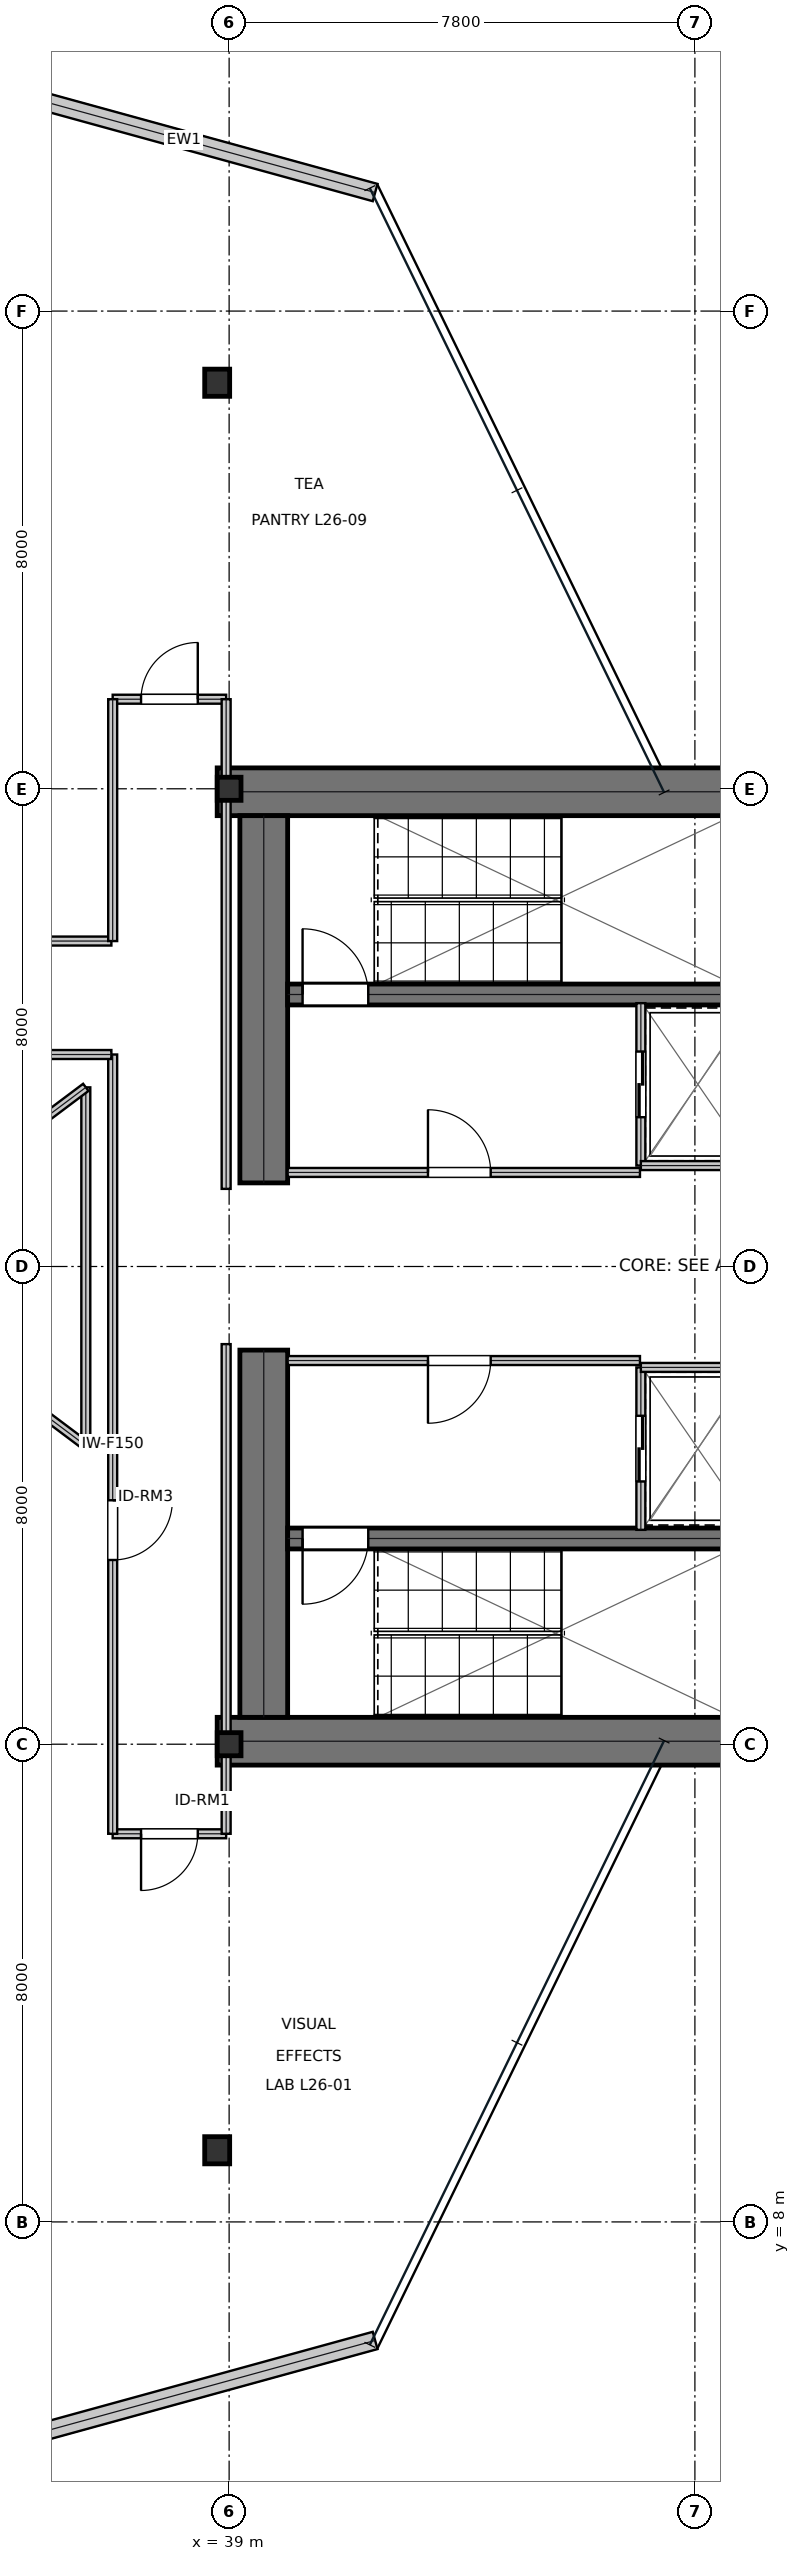
"""IFC4 building model, lengths in metres.
Left out: names, types, materials, properties, quantities, classifications, styles, units other than length and angle.
Written with IfcOpenShell. Run it as: python <this file> out.ifc"""

import sys

from ifc_helpers import new_model, si_unit, direction, frame, frame_2d, origin, origin_2d, place, context, subcontext, project, spatial, rectangle, i_section, extrude, element, fill, save


model = new_model("IFC4")
c1 = context("Model", 3, precision=1e-05, world=origin(), true_north=direction((0.0, 1.0)))
c2 = subcontext(c1, "Body", "Model", "MODEL_VIEW")
j1 = project(units=[si_unit("LENGTHUNIT", "METRE"), si_unit("PLANEANGLEUNIT", "RADIAN")], contexts=[c1])
p1 = place(None, origin())
s1 = spatial("IfcSite", under=j1, at=p1, CompositionType="ELEMENT")
p2 = place(p1, origin())
s2 = spatial("IfcBuilding", under=s1, at=p2, CompositionType="ELEMENT")
p3 = place(p2, frame((0.0, 0.0, 116.85)))
s3 = spatial("IfcBuildingStorey", under=s2, at=p3, CompositionType="ELEMENT", Elevation=116.85)
for number, where, z_axis, x_axis in (
    (1, (38.8, 31.95, 0.0), (0.0, 0.0, 1.0), (1.0, 0.0, 0.0)),
    (2, (38.8, 16.05, 0.0), (0.0, 0.0, 1.0), (1.0, 0.0, 0.0)),
):
    element("IfcWall", number, at=place(p3, frame(where, z_axis=z_axis, x_axis=x_axis)), inside=s3, PredefinedType="SHEAR", context=c2, shape_type="SweptSolid", body=[
        extrude(rectangle(XDim=16.0, YDim=0.8, at=frame_2d((8.0, 0.0))), origin(), (0.0, 0.0, 1.0), 3.81),
    ])
for number, where, z_axis, x_axis in (
    (3, (39.58, 16.45, 0.0), (0.0, 0.0, 1.0), (0.0, 1.0, 0.0)),
    (4, (39.58, 25.4, 0.0), (0.0, 0.0, 1.0), (0.0, 1.0, 0.0)),
):
    element("IfcWall", number, at=place(p3, frame(where, z_axis=z_axis, x_axis=x_axis)), inside=s3, PredefinedType="SHEAR", context=c2, shape_type="SweptSolid", body=[
        extrude(rectangle(XDim=6.15, YDim=0.8, at=frame_2d((3.075, 0.0))), origin(), (0.0, 0.0, 1.0), 3.81),
    ])
p4 = place(p3, frame((39.98, 28.555, 0.0), z_axis=(0.0, 0.0, 1.0), x_axis=(1.0, 0.0, 0.0)))
e5 = element("IfcWall", 5, at=p4, inside=s3, PredefinedType="SHEAR", context=c2, shape_type="SweptSolid", body=[
    extrude(rectangle(XDim=7.71, YDim=0.35, at=frame_2d((3.855, 0.0))), origin(), (0.0, 0.0, 1.0), 3.81),
])
p5 = place(p4, frame((0.25, 0.0, 0.0)))
e6 = element("IfcOpeningElement", 6, at=p5, cuts=e5, PredefinedType="OPENING", context=c2, shape_type="SweptSolid", body=[
    extrude(rectangle(XDim=1.1, YDim=2.15, at=frame_2d((0.55, 1.075))), frame((0.0, 0.185, 0.0), z_axis=(0.0, -1.0, 0.0), x_axis=(1.0, 0.0, 0.0)), (0.0, 0.0, 1.0), 0.37),
])
p6 = place(p3, frame((39.98, 19.445, 0.0), z_axis=(0.0, 0.0, 1.0), x_axis=(1.0, 0.0, 0.0)))
e7 = element("IfcWall", 7, at=p6, inside=s3, PredefinedType="SHEAR", context=c2, shape_type="SweptSolid", body=[
    extrude(rectangle(XDim=7.71, YDim=0.35, at=frame_2d((3.855, 0.0))), origin(), (0.0, 0.0, 1.0), 3.81),
])
p7 = place(p6, frame((0.25, 0.0, 0.0)))
e8 = element("IfcOpeningElement", 8, at=p7, cuts=e7, PredefinedType="OPENING", context=c2, shape_type="SweptSolid", body=[
    extrude(rectangle(XDim=1.1, YDim=2.15, at=frame_2d((0.55, 1.075))), frame((0.0, 0.185, 0.0), z_axis=(0.0, -1.0, 0.0), x_axis=(1.0, 0.0, 0.0)), (0.0, 0.0, 1.0), 0.37),
])
for number, where, z_axis, x_axis in (
    (9, (39.0, 16.0, 0.0), (0.0, 0.0, 1.0), (1.0, 0.0, 0.0)),
    (10, (39.0, 32.0, 0.0), (0.0, 0.0, 1.0), (1.0, 0.0, 0.0)),
):
    element("IfcColumn", number, at=place(p3, frame(where, z_axis=z_axis, x_axis=x_axis)), inside=s3, PredefinedType="COLUMN", context=c2, shape_type="SweptSolid", body=[
        extrude(i_section(OverallWidth=0.398, OverallDepth=0.387, WebThickness=0.021, FlangeThickness=0.033, at=origin_2d()), origin(), (0.0, 0.0, 1.0), 4.044),
    ])
for number, where, z_axis, x_axis in (
    (11, (38.8, 38.8, 0.016), (0.0, 0.0, 1.0), (1.0, 0.0, 0.0)),
    (12, (38.8, 9.2, 0.016), (0.0, 0.0, 1.0), (1.0, 0.0, 0.0)),
):
    element("IfcColumn", number, at=place(p3, frame(where, z_axis=z_axis, x_axis=x_axis)), inside=s3, PredefinedType="COLUMN", context=c2, shape_type="SweptSolid", body=[
        extrude(i_section(OverallWidth=0.418, OverallDepth=0.455, WebThickness=0.042, FlangeThickness=0.068, at=origin_2d()), origin(), (0.0, 0.0, 1.0), 4.018),
    ])
for number, where, z_axis, x_axis in (
    (13, (41.445, 41.985, 0.0), (0.0, 0.0, 1.0), (-0.964, 0.265, 0.0)),
    (14, (35.043, 4.255, 0.0), (0.0, 0.0, 1.0), (0.964, 0.265, 0.0)),
):
    element("IfcWall", number, at=place(p3, frame(where, z_axis=z_axis, x_axis=x_axis)), inside=s3, PredefinedType="STANDARD", context=c2, shape_type="SweptSolid", body=[
        extrude(rectangle(XDim=6.64, YDim=0.3, at=frame_2d((3.32, 0.0))), origin(), (0.0, 0.0, 1.0), 3.81),
    ])
p8 = place(p3, frame((39.98, 25.575, 0.0), z_axis=(0.0, 0.0, 1.0), x_axis=(1.0, 0.0, 0.0)))
e15 = element("IfcWall", 15, at=p8, inside=s3, PredefinedType="PARTITIONING", context=c2, shape_type="SweptSolid", body=[
    extrude(rectangle(XDim=5.9, YDim=0.15, at=frame_2d((2.95, 0.0))), origin(), (0.0, 0.0, 1.0), 3.81),
])
p9 = place(p8, frame((2.35, 0.0, 0.0)))
e16 = element("IfcOpeningElement", 16, at=p9, cuts=e15, PredefinedType="OPENING", context=c2, shape_type="SweptSolid", body=[
    extrude(rectangle(XDim=1.05, YDim=2.15, at=frame_2d((0.525, 1.075))), frame((0.0, 0.085, 0.0), z_axis=(0.0, -1.0, 0.0), x_axis=(1.0, 0.0, 0.0)), (0.0, 0.0, 1.0), 0.17),
])
p10 = place(p3, frame((39.98, 22.425, 0.0), z_axis=(0.0, 0.0, 1.0), x_axis=(1.0, 0.0, 0.0)))
e17 = element("IfcWall", 17, at=p10, inside=s3, PredefinedType="PARTITIONING", context=c2, shape_type="SweptSolid", body=[
    extrude(rectangle(XDim=5.9, YDim=0.15, at=frame_2d((2.95, 0.0))), origin(), (0.0, 0.0, 1.0), 3.81),
])
p11 = place(p10, frame((2.35, 0.0, 0.0)))
e18 = element("IfcOpeningElement", 18, at=p11, cuts=e17, PredefinedType="OPENING", context=c2, shape_type="SweptSolid", body=[
    extrude(rectangle(XDim=1.05, YDim=2.15, at=frame_2d((0.525, 1.075))), frame((0.0, 0.085, 0.0), z_axis=(0.0, -1.0, 0.0), x_axis=(1.0, 0.0, 0.0)), (0.0, 0.0, 1.0), 0.17),
])
p12 = place(p3, frame((45.895, 25.69, 0.0), z_axis=(0.0, 0.0, 1.0), x_axis=(0.0, 1.0, 0.0)))
e19 = element("IfcWall", 19, at=p12, inside=s3, PredefinedType="PARTITIONING", context=c2, shape_type="SweptSolid", body=[
    extrude(rectangle(XDim=2.72, YDim=0.15, at=frame_2d((1.36, 0.0))), origin(), (0.0, 0.0, 1.0), 3.81),
])
p13 = place(p12, frame((0.81, 0.0, 0.0)))
e20 = element("IfcOpeningElement", 20, at=p13, cuts=e19, PredefinedType="OPENING", context=c2, shape_type="SweptSolid", body=[
    extrude(rectangle(XDim=1.1, YDim=2.15, at=frame_2d((0.55, 1.075))), frame((0.0, 0.085, 0.0), z_axis=(0.0, -1.0, 0.0), x_axis=(1.0, 0.0, 0.0)), (0.0, 0.0, 1.0), 0.17),
])
p14 = place(p3, frame((45.895, 25.69, 0.0), z_axis=(0.0, 0.0, 1.0), x_axis=(1.0, 0.0, 0.0)))
e21 = element("IfcWall", 21, at=p14, inside=s3, PredefinedType="PARTITIONING", context=c2, shape_type="SweptSolid", body=[
    extrude(rectangle(XDim=1.915, YDim=0.15, at=frame_2d((0.958, 0.0))), origin(), (0.0, 0.0, 1.0), 3.81),
])
p15 = place(p3, frame((45.895, 19.59, 0.0), z_axis=(0.0, 0.0, 1.0), x_axis=(0.0, 1.0, 0.0)))
e22 = element("IfcWall", 22, at=p15, inside=s3, PredefinedType="PARTITIONING", context=c2, shape_type="SweptSolid", body=[
    extrude(rectangle(XDim=2.72, YDim=0.15, at=frame_2d((1.36, 0.0))), origin(), (0.0, 0.0, 1.0), 3.81),
])
p16 = place(p15, frame((0.81, 0.0, 0.0)))
e23 = element("IfcOpeningElement", 23, at=p16, cuts=e22, PredefinedType="OPENING", context=c2, shape_type="SweptSolid", body=[
    extrude(rectangle(XDim=1.1, YDim=2.15, at=frame_2d((0.55, 1.075))), frame((0.0, 0.085, 0.0), z_axis=(0.0, -1.0, 0.0), x_axis=(1.0, 0.0, 0.0)), (0.0, 0.0, 1.0), 0.17),
])
p17 = place(p3, frame((45.895, 22.31, 0.0), z_axis=(0.0, 0.0, 1.0), x_axis=(1.0, 0.0, 0.0)))
e24 = element("IfcWall", 24, at=p17, inside=s3, PredefinedType="PARTITIONING", context=c2, shape_type="SweptSolid", body=[
    extrude(rectangle(XDim=1.915, YDim=0.15, at=frame_2d((0.958, 0.0))), origin(), (0.0, 0.0, 1.0), 3.81),
])
p18 = place(p3, frame((37.05, 14.5, 0.0), z_axis=(0.0, 0.0, 1.0), x_axis=(1.0, 0.0, 0.0)))
e25 = element("IfcWall", 25, at=p18, inside=s3, PredefinedType="PARTITIONING", context=c2, shape_type="SweptSolid", body=[
    extrude(rectangle(XDim=1.9, YDim=0.15, at=frame_2d((0.95, 0.0))), origin(), (0.0, 0.0, 1.0), 3.19),
])
p19 = place(p18, frame((0.475, 0.0, 0.0)))
e26 = element("IfcOpeningElement", 26, at=p19, cuts=e25, PredefinedType="OPENING", context=c2, shape_type="SweptSolid", body=[
    extrude(rectangle(XDim=0.95, YDim=2.15, at=frame_2d((0.475, 1.075))), frame((0.0, 0.085, 0.0), z_axis=(0.0, -1.0, 0.0), x_axis=(1.0, 0.0, 0.0)), (0.0, 0.0, 1.0), 0.17),
])
p20 = place(p3, frame((37.05, 14.5, 0.0), z_axis=(0.0, 0.0, 1.0), x_axis=(0.0, 1.0, 0.0)))
e27 = element("IfcWall", 27, at=p20, inside=s3, PredefinedType="PARTITIONING", context=c2, shape_type="SweptSolid", body=[
    extrude(rectangle(XDim=13.05, YDim=0.15, at=frame_2d((6.525, 0.0))), origin(), (0.0, 0.0, 1.0), 3.19),
])
p21 = place(p20, frame((4.585, 0.0, 0.0)))
e28 = element("IfcOpeningElement", 28, at=p21, cuts=e27, PredefinedType="OPENING", context=c2, shape_type="SweptSolid", body=[
    extrude(rectangle(XDim=1.0, YDim=2.15, at=frame_2d((0.5, 1.075))), frame((0.0, 0.085, 0.0), z_axis=(0.0, -1.0, 0.0), x_axis=(1.0, 0.0, 0.0)), (0.0, 0.0, 1.0), 0.17),
])
p22 = place(p3, frame((29.4, 29.45, 0.0), z_axis=(0.0, 0.0, 1.0), x_axis=(1.0, 0.0, 0.0)))
e29 = element("IfcWall", 29, at=p22, inside=s3, PredefinedType="PARTITIONING", context=c2, shape_type="SweptSolid", body=[
    extrude(rectangle(XDim=7.628, YDim=0.15, at=frame_2d((3.814, 0.0))), origin(), (0.0, 0.0, 1.0), 3.19),
])
p23 = place(p22, frame((3.314, 0.0, 0.0)))
e30 = element("IfcOpeningElement", 30, at=p23, cuts=e29, PredefinedType="OPENING", context=c2, shape_type="SweptSolid", body=[
    extrude(rectangle(XDim=1.0, YDim=2.15, at=frame_2d((0.5, 1.075))), frame((0.0, 0.085, 0.0), z_axis=(0.0, -1.0, 0.0), x_axis=(1.0, 0.0, 0.0)), (0.0, 0.0, 1.0), 0.17),
])
p24 = place(p3, frame((37.05, 33.5, 0.0), z_axis=(0.0, 0.0, 1.0), x_axis=(1.0, 0.0, 0.0)))
e31 = element("IfcWall", 31, at=p24, inside=s3, PredefinedType="PARTITIONING", context=c2, shape_type="SweptSolid", body=[
    extrude(rectangle(XDim=1.9, YDim=0.15, at=frame_2d((0.95, 0.0))), origin(), (0.0, 0.0, 1.0), 3.19),
])
p25 = place(p24, frame((0.475, 0.0, 0.0)))
e32 = element("IfcOpeningElement", 32, at=p25, cuts=e31, PredefinedType="OPENING", context=c2, shape_type="SweptSolid", body=[
    extrude(rectangle(XDim=0.95, YDim=2.15, at=frame_2d((0.475, 1.075))), frame((0.0, 0.085, 0.0), z_axis=(0.0, -1.0, 0.0), x_axis=(1.0, 0.0, 0.0)), (0.0, 0.0, 1.0), 0.17),
])
p26 = place(p3, frame((38.95, 14.5, 0.0), z_axis=(0.0, 0.0, 1.0), x_axis=(0.0, 1.0, 0.0)))
e33 = element("IfcWall", 33, at=p26, inside=s3, PredefinedType="PARTITIONING", context=c2, shape_type="SweptSolid", body=[
    extrude(rectangle(XDim=8.2, YDim=0.15, at=frame_2d((4.1, 0.0))), origin(), (0.0, 0.0, 1.0), 3.19),
])
p27 = place(p3, frame((29.4, 27.55, 0.0), z_axis=(0.0, 0.0, 1.0), x_axis=(1.0, 0.0, 0.0)))
e34 = element("IfcWall", 34, at=p27, inside=s3, PredefinedType="PARTITIONING", context=c2, shape_type="SweptSolid", body=[
    extrude(rectangle(XDim=7.628, YDim=0.15, at=frame_2d((3.814, 0.0))), origin(), (0.0, 0.0, 1.0), 3.19),
])
p28 = place(p3, frame((37.05, 29.45, 0.0), z_axis=(0.0, 0.0, 1.0), x_axis=(0.0, 1.0, 0.0)))
e35 = element("IfcWall", 35, at=p28, inside=s3, PredefinedType="PARTITIONING", context=c2, shape_type="SweptSolid", body=[
    extrude(rectangle(XDim=4.05, YDim=0.15, at=frame_2d((2.025, 0.0))), origin(), (0.0, 0.0, 1.0), 3.19),
])
p29 = place(p3, frame((38.95, 25.3, 0.0), z_axis=(0.0, 0.0, 1.0), x_axis=(0.0, 1.0, 0.0)))
e36 = element("IfcWall", 36, at=p29, inside=s3, PredefinedType="PARTITIONING", context=c2, shape_type="SweptSolid", body=[
    extrude(rectangle(XDim=8.2, YDim=0.15, at=frame_2d((4.1, 0.0))), origin(), (0.0, 0.0, 1.0), 3.19),
])
p30 = place(p3, frame((32.6, 24.0, 0.0), z_axis=(0.0, 0.0, 1.0), x_axis=(0.8, -0.6, 0.0)))
e37 = element("IfcWall", 37, at=p30, inside=s3, PredefinedType="MOVABLE", context=c2, shape_type="SweptSolid", body=[
    extrude(rectangle(XDim=5.0, YDim=0.15, at=frame_2d((2.5, 0.0))), origin(), (0.0, 0.0, 1.0), 3.81),
])
p31 = place(p3, frame((36.6, 21.0, 0.0), z_axis=(0.0, 0.0, 1.0), x_axis=(0.0, 1.0, 0.0)))
e38 = element("IfcWall", 38, at=p31, inside=s3, PredefinedType="MOVABLE", context=c2, shape_type="SweptSolid", body=[
    extrude(rectangle(XDim=6.0, YDim=0.15, at=frame_2d((3.0, 0.0))), origin(), (0.0, 0.0, 1.0), 3.81),
])
p32 = place(p3, frame((36.6, 27.0, 0.0), z_axis=(0.0, 0.0, 1.0), x_axis=(-0.8, -0.6, 0.0)))
e39 = element("IfcWall", 39, at=p32, inside=s3, PredefinedType="MOVABLE", context=c2, shape_type="SweptSolid", body=[
    extrude(rectangle(XDim=5.0, YDim=0.15, at=frame_2d((2.5, 0.0))), origin(), (0.0, 0.0, 1.0), 3.81),
])
p33 = place(p9, origin())
e40 = element("IfcDoor", 40, at=p33, inside=s3, OperationType="SINGLE_SWING_LEFT", PredefinedType="DOOR", context=c2, shape_type="SweptSolid", body=[
    extrude(rectangle(XDim=1.05, YDim=2.15, at=frame_2d((0.525, 1.075))), frame((0.0, 0.025, 0.0), z_axis=(0.0, -1.0, 0.0), x_axis=(1.0, 0.0, 0.0)), (0.0, 0.0, 1.0), 0.05),
])
fill(e16, e40)
p34 = place(p11, frame((1.05, 0.0, 0.0), z_axis=(0.0, 0.0, 1.0), x_axis=(-1.0, 0.0, 0.0)))
e41 = element("IfcDoor", 41, at=p34, inside=s3, OperationType="SINGLE_SWING_RIGHT", PredefinedType="DOOR", context=c2, shape_type="SweptSolid", body=[
    extrude(rectangle(XDim=1.05, YDim=2.15, at=frame_2d((0.525, 1.075))), frame((0.0, 0.025, 0.0), z_axis=(0.0, -1.0, 0.0), x_axis=(1.0, 0.0, 0.0)), (0.0, 0.0, 1.0), 0.05),
])
fill(e18, e41)
p35 = place(p13, frame((1.1, 0.0, 0.0), z_axis=(0.0, 0.0, 1.0), x_axis=(-1.0, 0.0, 0.0)))
e42 = element("IfcDoor", 42, at=p35, inside=s3, OperationType="DOUBLE_DOOR_SLIDING", PredefinedType="DOOR", context=c2, shape_type="SweptSolid", body=[
    extrude(rectangle(XDim=1.1, YDim=2.15, at=frame_2d((0.55, 1.075))), frame((0.0, 0.025, 0.0), z_axis=(0.0, -1.0, 0.0), x_axis=(1.0, 0.0, 0.0)), (0.0, 0.0, 1.0), 0.05),
])
fill(e20, e42)
p36 = place(p16, frame((1.1, 0.0, 0.0), z_axis=(0.0, 0.0, 1.0), x_axis=(-1.0, 0.0, 0.0)))
e43 = element("IfcDoor", 43, at=p36, inside=s3, OperationType="DOUBLE_DOOR_SLIDING", PredefinedType="DOOR", context=c2, shape_type="SweptSolid", body=[
    extrude(rectangle(XDim=1.1, YDim=2.15, at=frame_2d((0.55, 1.075))), frame((0.0, 0.025, 0.0), z_axis=(0.0, -1.0, 0.0), x_axis=(1.0, 0.0, 0.0)), (0.0, 0.0, 1.0), 0.05),
])
fill(e23, e43)
p37 = place(p19, frame((0.95, 0.0, 0.0), z_axis=(0.0, 0.0, 1.0), x_axis=(-1.0, 0.0, 0.0)))
e44 = element("IfcDoor", 44, at=p37, inside=s3, OperationType="SINGLE_SWING_RIGHT", PredefinedType="DOOR", context=c2, shape_type="SweptSolid", body=[
    extrude(rectangle(XDim=0.95, YDim=2.15, at=frame_2d((0.475, 1.075))), frame((0.0, 0.025, 0.0), z_axis=(0.0, -1.0, 0.0), x_axis=(1.0, 0.0, 0.0)), (0.0, 0.0, 1.0), 0.05),
])
fill(e26, e44)
p38 = place(p21, frame((1.0, 0.0, 0.0), z_axis=(0.0, 0.0, 1.0), x_axis=(-1.0, 0.0, 0.0)))
e45 = element("IfcDoor", 45, at=p38, inside=s3, OperationType="SINGLE_SWING_LEFT", PredefinedType="DOOR", context=c2, shape_type="SweptSolid", body=[
    extrude(rectangle(XDim=1.0, YDim=2.15, at=frame_2d((0.5, 1.075))), frame((0.0, 0.025, 0.0), z_axis=(0.0, -1.0, 0.0), x_axis=(1.0, 0.0, 0.0)), (0.0, 0.0, 1.0), 0.05),
])
fill(e28, e45)
p39 = place(p25, origin())
e46 = element("IfcDoor", 46, at=p39, inside=s3, OperationType="SINGLE_SWING_RIGHT", PredefinedType="DOOR", context=c2, shape_type="SweptSolid", body=[
    extrude(rectangle(XDim=0.95, YDim=2.15, at=frame_2d((0.475, 1.075))), frame((0.0, 0.025, 0.0), z_axis=(0.0, -1.0, 0.0), x_axis=(1.0, 0.0, 0.0)), (0.0, 0.0, 1.0), 0.05),
])
fill(e32, e46)
p40 = place(p5, origin())
e47 = element("IfcDoor", 47, at=p40, inside=s3, OperationType="SINGLE_SWING_LEFT", PredefinedType="DOOR", context=c2, shape_type="SweptSolid", body=[
    extrude(rectangle(XDim=1.1, YDim=2.15, at=frame_2d((0.55, 1.075))), frame((0.0, 0.025, 0.0), z_axis=(0.0, -1.0, 0.0), x_axis=(1.0, 0.0, 0.0)), (0.0, 0.0, 1.0), 0.05),
])
fill(e6, e47)
p41 = place(p7, frame((1.1, 0.0, 0.0), z_axis=(0.0, 0.0, 1.0), x_axis=(-1.0, 0.0, 0.0)))
e48 = element("IfcDoor", 48, at=p41, inside=s3, OperationType="SINGLE_SWING_RIGHT", PredefinedType="DOOR", context=c2, shape_type="SweptSolid", body=[
    extrude(rectangle(XDim=1.1, YDim=2.15, at=frame_2d((0.55, 1.075))), frame((0.0, 0.025, 0.0), z_axis=(0.0, -1.0, 0.0), x_axis=(1.0, 0.0, 0.0)), (0.0, 0.0, 1.0), 0.05),
])
fill(e8, e48)
save(model, sys.argv[1])
